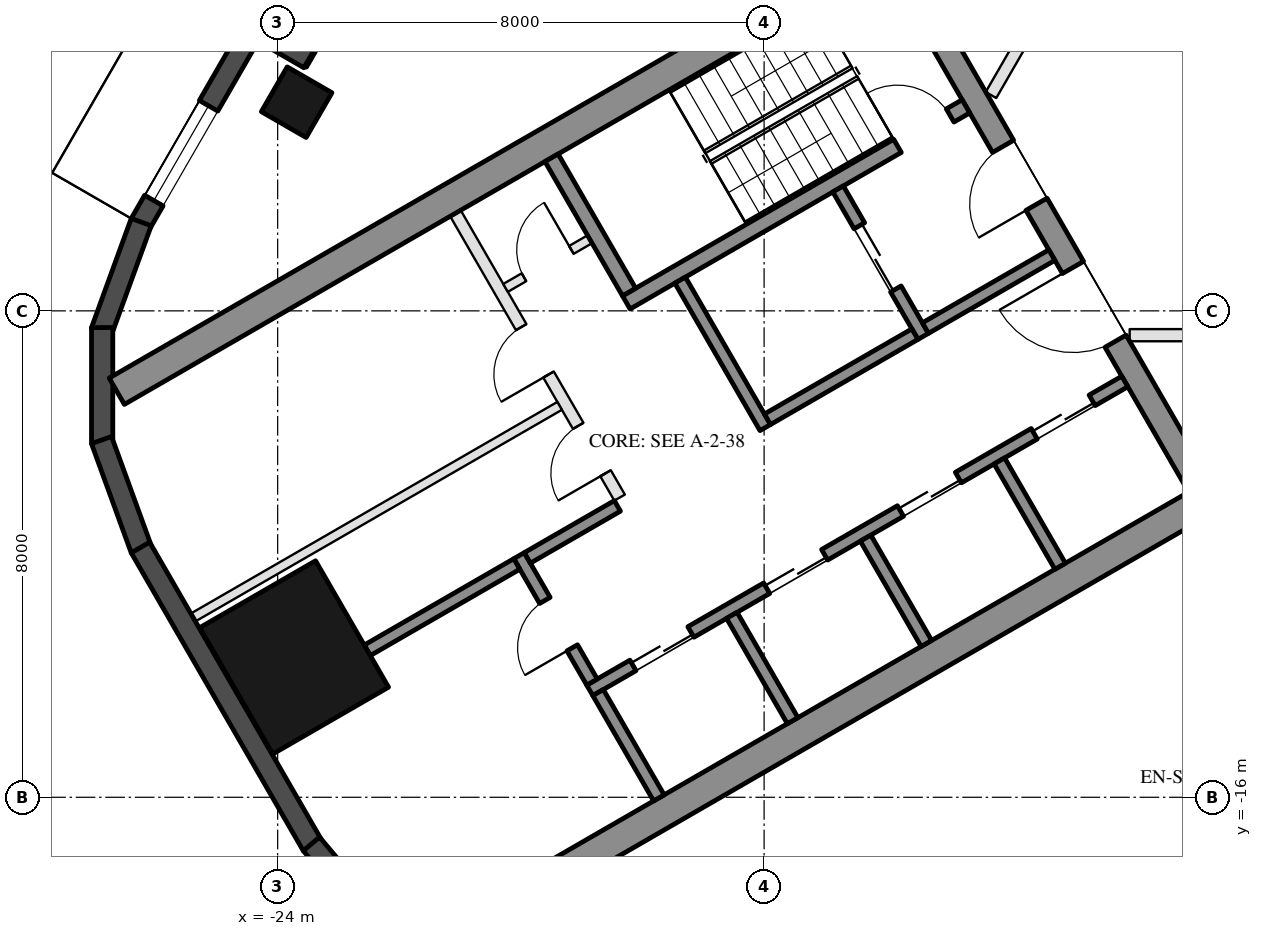
"""IFC4 building model, lengths in metres.
Left out: names, types, materials, properties, quantities, classifications, styles, units other than length and angle.
Written with IfcOpenShell. Run it as: python <this file> out.ifc"""

import sys

from ifc_helpers import new_model, si_unit, direction, frame, frame_2d, origin, origin_2d, place, context, subcontext, project, spatial, rectangle, hollow_rectangle, extrude, element, fill, save


model = new_model("IFC4")
c1 = context("Model", 3, precision=1e-05, world=origin(), true_north=direction((0.0, 1.0)))
c2 = subcontext(c1, "Body", "Model", "MODEL_VIEW")
j1 = project(units=[si_unit("LENGTHUNIT", "METRE"), si_unit("PLANEANGLEUNIT", "RADIAN")], contexts=[c1])
p1 = place(None, origin())
s1 = spatial("IfcSite", under=j1, at=p1, CompositionType="ELEMENT")
p2 = place(p1, origin())
s2 = spatial("IfcBuilding", under=s1, at=p2, CompositionType="ELEMENT")
p3 = place(p2, frame((0.0, 0.0, 165.1)))
s3 = spatial("IfcBuildingStorey", under=s2, at=p3, CompositionType="ELEMENT", Elevation=165.1)
p4 = place(p3, frame((-23.688, -4.568, 0.0), z_axis=(0.0, 0.0, 1.0), x_axis=(0.5, 0.866025403784, 0.0)))
e1 = element("IfcColumn", 1, at=p4, inside=s3, PredefinedType="COLUMN", context=c2, shape_type="SweptSolid", body=[
    extrude(hollow_rectangle(XDim=0.85, YDim=0.85, WallThickness=0.04, at=origin_2d()), origin(), (0.0, 0.0, 1.0), 3.7),
])
p5 = place(p3, frame((-23.729, -13.7, 0.0), z_axis=(0.0, 0.0, 1.0), x_axis=(-0.5, 0.866025403784, 0.0)))
e2 = element("IfcColumn", 2, at=p5, inside=s3, PredefinedType="COLUMN", context=c2, shape_type="SweptSolid", body=[
    extrude(hollow_rectangle(XDim=2.4, YDim=2.2, WallThickness=0.06, at=origin_2d()), origin(), (0.0, 0.0, 1.0), 3.7),
])
p6 = place(p3, frame((-20.309, 1.934, 0.0), z_axis=(0.0, 0.0, 1.0), x_axis=(-0.499992114976, -0.866029956157, 0.0)))
e3 = element("IfcWall", 3, at=p6, inside=s3, PredefinedType="SOLIDWALL", context=c2, shape_type="SweptSolid", body=[
    extrude(rectangle(XDim=6.74, YDim=0.35, at=frame_2d((3.37, 0.0))), origin(), (0.0, 0.0, 1.0), 3.55),
])
p7 = place(p6, frame((4.02, 0.0, 0.0)))
e4 = element("IfcOpeningElement", 4, at=p7, cuts=e3, PredefinedType="OPENING", context=c2, shape_type="SweptSolid", body=[
    extrude(rectangle(XDim=2.4, YDim=2.4, at=frame_2d((1.2, 1.2))), frame((0.0, 0.185, 0.0), z_axis=(0.0, -1.0, 0.0), x_axis=(1.0, 0.0, 0.0)), (0.0, 0.0, 1.0), 0.37),
])
p8 = place(p6, frame((0.77, 0.0, 0.3)))
e5 = element("IfcOpeningElement", 5, at=p8, cuts=e3, PredefinedType="OPENING", context=c2, shape_type="SweptSolid", body=[
    extrude(rectangle(XDim=2.9, YDim=2.65, at=frame_2d((1.45, 1.325))), frame((0.0, 0.185, 0.0), z_axis=(0.0, -1.0, 0.0), x_axis=(1.0, 0.0, 0.0)), (0.0, 0.0, 1.0), 0.37),
])
p9 = place(p3, frame((-23.481, -3.85, 0.0), z_axis=(0.0, 0.0, 1.0), x_axis=(-0.866092288191, 0.499884134912, 0.0)))
e6 = element("IfcWall", 6, at=p9, inside=s3, PredefinedType="SOLIDWALL", context=c2, shape_type="SweptSolid", body=[
    extrude(rectangle(XDim=1.22, YDim=0.35, at=frame_2d((0.61, 0.0))), origin(), (0.0, 0.0, 1.0), 3.55),
])
p10 = place(p3, frame((-24.299, -3.176, 0.0), z_axis=(0.0, 0.0, 1.0), x_axis=(-0.500028278809, -0.866009076391, 0.0)))
e7 = element("IfcWall", 7, at=p10, inside=s3, PredefinedType="SOLIDWALL", context=c2, shape_type="SweptSolid", body=[
    extrude(rectangle(XDim=3.916, YDim=0.35, at=frame_2d((1.958, 0.0))), origin(), (0.0, 0.0, 1.0), 3.55),
])
p11 = place(p10, frame((1.675, 0.0, 0.3)))
e8 = element("IfcOpeningElement", 8, at=p11, cuts=e7, PredefinedType="OPENING", context=c2, shape_type="SweptSolid", body=[
    extrude(rectangle(XDim=1.8, YDim=2.65, at=frame_2d((0.9, 1.325))), frame((0.0, 0.185, 0.0), z_axis=(0.0, -1.0, 0.0), x_axis=(1.0, 0.0, 0.0)), (0.0, 0.0, 1.0), 0.37),
])
for number, where, z_axis, x_axis in (
    (9, (-26.244, -6.54, 0.0), (0.0, 0.0, 1.0), (-0.342, -0.94, 0.0)),
    (10, (-26.886, -8.275, 0.0), (0.0, 0.0, 1.0), (0.0, -1.0, 0.0)),
    (11, (-26.897, -10.125, 0.0), (0.0, 0.0, 1.0), (0.342, -0.94, 0.0)),
):
    element("IfcWall", number, at=place(p3, frame(where, z_axis=z_axis, x_axis=x_axis)), inside=s3, PredefinedType="SOLIDWALL", context=c2, shape_type="SweptSolid", body=[
        extrude(rectangle(XDim=1.91, YDim=0.35, at=frame_2d((0.955, 0.0))), origin(), (0.0, 0.0, 1.0), 3.55),
    ])
p12 = place(p3, frame((-26.257, -11.893, 0.0), z_axis=(0.0, 0.0, 1.0), x_axis=(0.500018773155, -0.866014564827, 0.0)))
e12 = element("IfcWall", 12, at=p12, inside=s3, PredefinedType="SOLIDWALL", context=c2, shape_type="SweptSolid", body=[
    extrude(rectangle(XDim=5.658, YDim=0.35, at=frame_2d((2.829, 0.0))), origin(), (0.0, 0.0, 1.0), 3.55),
])
p13 = place(p3, frame((-23.445, -16.768, 0.0), z_axis=(0.0, 0.0, 1.0), x_axis=(0.642733291068, -0.76609001857, 0.0)))
e13 = element("IfcWall", 13, at=p13, inside=s3, PredefinedType="SOLIDWALL", context=c2, shape_type="SweptSolid", body=[
    extrude(rectangle(XDim=1.91, YDim=0.35, at=frame_2d((0.955, 0.0))), origin(), (0.0, 0.0, 1.0), 3.55),
])
for number, where, z_axis, x_axis in (
    (14, (-13.797, -1.903, 0.0), (0.0, 0.0, 1.0), (-0.866, -0.5, 0.0)),
    (15, (-8.547, -10.997, 0.0), (0.0, 0.0, 1.0), (-0.866, -0.5, 0.0)),
):
    element("IfcWall", number, at=place(p3, frame(where, z_axis=z_axis, x_axis=x_axis)), inside=s3, PredefinedType="SHEAR", context=c2, shape_type="SweptSolid", body=[
        extrude(rectangle(XDim=14.837, YDim=0.5, at=frame_2d((7.418, 0.0))), origin(), (0.0, 0.0, 1.0), 3.5),
    ])
p14 = place(p3, frame((-13.845, -2.22, 0.0), z_axis=(0.0, 0.0, 1.0), x_axis=(0.500004234368, -0.866022959057, 0.0)))
e16 = element("IfcWall", 16, at=p14, inside=s3, PredefinedType="SHEAR", context=c2, shape_type="SweptSolid", body=[
    extrude(rectangle(XDim=10.0, YDim=0.4, at=frame_2d((5.0, 0.0))), origin(), (0.0, 0.0, 1.0), 3.5),
])
p15 = place(p14, frame((3.55, 0.0, 0.0)))
e17 = element("IfcOpeningElement", 17, at=p15, cuts=e16, PredefinedType="OPENING", context=c2, shape_type="SweptSolid", body=[
    extrude(rectangle(XDim=1.1, YDim=2.1, at=frame_2d((0.55, 1.05))), frame((0.0, 0.21, 0.0), z_axis=(0.0, -1.0, 0.0), x_axis=(1.0, 0.0, 0.0)), (0.0, 0.0, 1.0), 0.42),
])
p16 = place(p14, frame((5.85, 0.0, 0.0)))
e18 = element("IfcOpeningElement", 18, at=p16, cuts=e16, PredefinedType="OPENING", context=c2, shape_type="SweptSolid", body=[
    extrude(rectangle(XDim=1.4, YDim=2.1, at=frame_2d((0.7, 1.05))), frame((0.0, 0.21, 0.0), z_axis=(0.0, -1.0, 0.0), x_axis=(1.0, 0.0, 0.0)), (0.0, 0.0, 1.0), 0.42),
])
p17 = place(p3, frame((-12.681, -4.636, 0.0), z_axis=(0.0, 0.0, 1.0), x_axis=(-0.866021702275, -0.500006411147, 0.0)))
e19 = element("IfcWall", 19, at=p17, inside=s3, PredefinedType="SHEAR", context=c2, shape_type="SweptSolid", body=[
    extrude(rectangle(XDim=6.45, YDim=0.25, at=frame_2d((3.225, 0.0))), origin(), (0.0, 0.0, 1.0), 3.5),
])
p18 = place(p17, frame((0.3, 0.0, 0.0)))
e20 = element("IfcOpeningElement", 20, at=p18, cuts=e19, PredefinedType="OPENING", context=c2, shape_type="SweptSolid", body=[
    extrude(rectangle(XDim=1.0, YDim=2.1, at=frame_2d((0.5, 1.05))), frame((0.0, 0.135, 0.0), z_axis=(0.0, -1.0, 0.0), x_axis=(1.0, 0.0, 0.0)), (0.0, 0.0, 1.0), 0.27),
])
p19 = place(p3, frame((-19.496, -5.482, 0.0), z_axis=(0.0, 0.0, 1.0), x_axis=(0.499990435942, -0.866030925526, 0.0)))
e21 = element("IfcWall", 21, at=p19, inside=s3, PredefinedType="SHEAR", context=c2, shape_type="SweptSolid", body=[
    extrude(rectangle(XDim=2.55, YDim=0.25, at=frame_2d((1.275, 0.0))), origin(), (0.0, 0.0, 1.0), 3.5),
])
p20 = place(p3, frame((-17.381, -7.495, 0.0), z_axis=(0.0, 0.0, 1.0), x_axis=(0.500011755427, -0.866018616679, 0.0)))
e22 = element("IfcWall", 22, at=p20, inside=s3, PredefinedType="SHEAR", context=c2, shape_type="SweptSolid", body=[
    extrude(rectangle(XDim=2.8, YDim=0.2, at=frame_2d((1.4, 0.0))), origin(), (0.0, 0.0, 1.0), 3.5),
])
p21 = place(p3, frame((-14.783, -5.995, 0.0), z_axis=(0.0, 0.0, 1.0), x_axis=(0.49994636267, -0.866056369097, 0.0)))
e23 = element("IfcWall", 23, at=p21, inside=s3, PredefinedType="SHEAR", context=c2, shape_type="SweptSolid", body=[
    extrude(rectangle(XDim=2.8, YDim=0.2, at=frame_2d((1.4, 0.0))), origin(), (0.0, 0.0, 1.0), 3.5),
])
p22 = place(p21, frame((0.7, 0.0, 0.0)))
e24 = element("IfcOpeningElement", 24, at=p22, cuts=e23, PredefinedType="OPENING", context=c2, shape_type="SweptSolid", body=[
    extrude(rectangle(XDim=1.2, YDim=2.1, at=frame_2d((0.6, 1.05))), frame((0.0, 0.11, 0.0), z_axis=(0.0, -1.0, 0.0), x_axis=(1.0, 0.0, 0.0)), (0.0, 0.0, 1.0), 0.22),
])
p23 = place(p3, frame((-13.52, -8.383, 0.0), z_axis=(0.0, 0.0, 1.0), x_axis=(-0.866034573852, -0.49998411664, 0.0)))
e25 = element("IfcWall", 25, at=p23, inside=s3, PredefinedType="SHEAR", context=c2, shape_type="SweptSolid", body=[
    extrude(rectangle(XDim=2.8, YDim=0.2, at=frame_2d((1.4, 0.0))), origin(), (0.0, 0.0, 1.0), 3.5),
])
p24 = place(p3, frame((-11.268, -7.083, 0.0), z_axis=(0.0, 0.0, 1.0), x_axis=(-0.866050077142, -0.499957262057, 0.0)))
e26 = element("IfcWall", 26, at=p24, inside=s3, PredefinedType="SHEAR", context=c2, shape_type="SweptSolid", body=[
    extrude(rectangle(XDim=2.4, YDim=0.2, at=frame_2d((1.2, 0.0))), origin(), (0.0, 0.0, 1.0), 3.5),
])
p25 = place(p3, frame((-10.068, -9.162, 0.0), z_axis=(0.0, 0.0, 1.0), x_axis=(-0.866032725843, -0.499987317609, 0.0)))
e27 = element("IfcWall", 27, at=p25, inside=s3, PredefinedType="SHEAR", context=c2, shape_type="SweptSolid", body=[
    extrude(rectangle(XDim=10.16, YDim=0.2, at=frame_2d((5.08, 0.0))), origin(), (0.0, 0.0, 1.0), 3.5),
])
p26 = place(p25, frame((0.62, 0.0, 0.0)))
e28 = element("IfcOpeningElement", 28, at=p26, cuts=e27, PredefinedType="OPENING", context=c2, shape_type="SweptSolid", body=[
    extrude(rectangle(XDim=1.1, YDim=2.1, at=frame_2d((0.55, 1.05))), frame((0.0, 0.11, 0.0), z_axis=(0.0, -1.0, 0.0), x_axis=(1.0, 0.0, 0.0)), (0.0, 0.0, 1.0), 0.22),
])
p27 = place(p25, frame((3.16, 0.0, 0.0)))
e29 = element("IfcOpeningElement", 29, at=p27, cuts=e27, PredefinedType="OPENING", context=c2, shape_type="SweptSolid", body=[
    extrude(rectangle(XDim=1.1, YDim=2.1, at=frame_2d((0.55, 1.05))), frame((0.0, 0.11, 0.0), z_axis=(0.0, -1.0, 0.0), x_axis=(1.0, 0.0, 0.0)), (0.0, 0.0, 1.0), 0.22),
])
p28 = place(p25, frame((5.7, 0.0, 0.0)))
e30 = element("IfcOpeningElement", 30, at=p28, cuts=e27, PredefinedType="OPENING", context=c2, shape_type="SweptSolid", body=[
    extrude(rectangle(XDim=1.1, YDim=2.1, at=frame_2d((0.55, 1.05))), frame((0.0, 0.11, 0.0), z_axis=(0.0, -1.0, 0.0), x_axis=(1.0, 0.0, 0.0)), (0.0, 0.0, 1.0), 0.22),
])
p29 = place(p25, frame((8.24, 0.0, 0.0)))
e31 = element("IfcOpeningElement", 31, at=p29, cuts=e27, PredefinedType="OPENING", context=c2, shape_type="SweptSolid", body=[
    extrude(rectangle(XDim=1.1, YDim=2.1, at=frame_2d((0.55, 1.05))), frame((0.0, 0.11, 0.0), z_axis=(0.0, -1.0, 0.0), x_axis=(1.0, 0.0, 0.0)), (0.0, 0.0, 1.0), 0.22),
])
p30 = place(p3, frame((-20.031, -12.026, 0.0), z_axis=(0.0, 0.0, 1.0), x_axis=(0.500033551112, -0.866006032174, 0.0)))
e32 = element("IfcWall", 32, at=p30, inside=s3, PredefinedType="SHEAR", context=c2, shape_type="SweptSolid", body=[
    extrude(rectangle(XDim=2.4, YDim=0.2, at=frame_2d((1.2, 0.0))), origin(), (0.0, 0.0, 1.0), 3.5),
])
p31 = place(p30, frame((0.85, 0.0, 0.0)))
e33 = element("IfcOpeningElement", 33, at=p31, cuts=e32, PredefinedType="OPENING", context=c2, shape_type="SweptSolid", body=[
    extrude(rectangle(XDim=0.9, YDim=2.1, at=frame_2d((0.45, 1.05))), frame((0.0, 0.11, 0.0), z_axis=(0.0, -1.0, 0.0), x_axis=(1.0, 0.0, 0.0)), (0.0, 0.0, 1.0), 0.22),
])
p32 = place(p3, frame((-18.413, -11.208, 0.0), z_axis=(0.0, 0.0, 1.0), x_axis=(-0.866038183914, -0.499977863513, 0.0)))
e34 = element("IfcWall", 34, at=p32, inside=s3, PredefinedType="SHEAR", context=c2, shape_type="SweptSolid", body=[
    extrude(rectangle(XDim=1.71, YDim=0.2, at=frame_2d((0.855, 0.0))), origin(), (0.0, 0.0, 1.0), 3.5),
])
for number, where, z_axis, x_axis in (
    (35, (-12.131, -10.468, 0.0), (0.0, 0.0, 1.0), (0.5, -0.866, 0.0)),
    (36, (-14.331, -11.738, 0.0), (0.0, 0.0, 1.0), (0.5, -0.866, 0.0)),
    (37, (-16.531, -13.008, 0.0), (0.0, 0.0, 1.0), (0.5, -0.866, 0.0)),
    (38, (-18.73, -14.278, 0.0), (0.0, 0.0, 1.0), (0.5, -0.866, 0.0)),
):
    element("IfcWall", number, at=place(p3, frame(where, z_axis=z_axis, x_axis=x_axis)), inside=s3, PredefinedType="SHEAR", context=c2, shape_type="SweptSolid", body=[
        extrude(rectangle(XDim=2.0, YDim=0.2, at=frame_2d((1.0, 0.0))), origin(), (0.0, 0.0, 1.0), 3.5),
    ])
p33 = place(p3, frame((-20.067, -12.163, 0.0), z_axis=(0.0, 0.0, 1.0), x_axis=(-0.866055327414, -0.49994816717, 0.0)))
e39 = element("IfcWall", 39, at=p33, inside=s3, PredefinedType="SHEAR", context=c2, shape_type="SweptSolid", body=[
    extrude(rectangle(XDim=2.84, YDim=0.2, at=frame_2d((1.42, 0.0))), origin(), (0.0, 0.0, 1.0), 3.5),
])
p34 = place(p3, frame((-21.076, -6.395, 0.0), z_axis=(0.0, 0.0, 1.0), x_axis=(0.50001468107, -0.866016927499, 0.0)))
e40 = element("IfcWall", 40, at=p34, inside=s3, PredefinedType="PARTITIONING", context=c2, shape_type="SweptSolid", body=[
    extrude(rectangle(XDim=5.4, YDim=0.2, at=frame_2d((2.7, 0.0))), origin(), (0.0, 0.0, 1.0), 3.5),
])
p35 = place(p34, frame((2.163, 0.0, 0.0)))
e41 = element("IfcOpeningElement", 41, at=p35, cuts=e40, PredefinedType="OPENING", context=c2, shape_type="SweptSolid", body=[
    extrude(rectangle(XDim=0.9, YDim=2.1, at=frame_2d((0.45, 1.05))), frame((0.0, 0.11, 0.0), z_axis=(0.0, -1.0, 0.0), x_axis=(1.0, 0.0, 0.0)), (0.0, 0.0, 1.0), 0.22),
])
p36 = place(p34, frame((4.038, 0.0, 0.0)))
e42 = element("IfcOpeningElement", 42, at=p36, cuts=e40, PredefinedType="OPENING", context=c2, shape_type="SweptSolid", body=[
    extrude(rectangle(XDim=0.9, YDim=2.1, at=frame_2d((0.45, 1.05))), frame((0.0, 0.11, 0.0), z_axis=(0.0, -1.0, 0.0), x_axis=(1.0, 0.0, 0.0)), (0.0, 0.0, 1.0), 0.22),
])
p37 = place(p3, frame((-18.866, -6.822, 0.0), z_axis=(0.0, 0.0, 1.0), x_axis=(-0.866028054938, -0.499995408039, 0.0)))
e43 = element("IfcWall", 43, at=p37, inside=s3, PredefinedType="PARTITIONING", context=c2, shape_type="SweptSolid", body=[
    extrude(rectangle(XDim=1.6, YDim=0.15, at=frame_2d((0.8, 0.0))), origin(), (0.0, 0.0, 1.0), 3.5),
])
p38 = place(p37, frame((0.35, 0.0, 0.0)))
e44 = element("IfcOpeningElement", 44, at=p38, cuts=e43, PredefinedType="OPENING", context=c2, shape_type="SweptSolid", body=[
    extrude(rectangle(XDim=0.9, YDim=2.1, at=frame_2d((0.45, 1.05))), frame((0.0, 0.085, 0.0), z_axis=(0.0, -1.0, 0.0), x_axis=(1.0, 0.0, 0.0)), (0.0, 0.0, 1.0), 0.17),
])
p39 = place(p3, frame((-19.363, -9.562, 0.0), z_axis=(0.0, 0.0, 1.0), x_axis=(-0.866016523273, -0.500015381182, 0.0)))
e45 = element("IfcWall", 45, at=p39, inside=s3, PredefinedType="PARTITIONING", context=c2, shape_type="SweptSolid", body=[
    extrude(rectangle(XDim=6.95, YDim=0.15, at=frame_2d((3.475, 0.0))), origin(), (0.0, 0.0, 1.0), 3.5),
])
p40 = place(p3, frame((-6.112, -8.4, 0.0), z_axis=(0.0, 0.0, 1.0), x_axis=(-1.0, 0.0, 0.0)))
e46 = element("IfcWall", 46, at=p40, inside=s3, PredefinedType="PARTITIONING", context=c2, shape_type="SweptSolid", body=[
    extrude(rectangle(XDim=3.876, YDim=0.2, at=frame_2d((1.938, 0.0))), origin(), (0.0, 0.0, 1.0), 2.95),
])
p41 = place(p40, frame((1.438, 0.0, 0.0)))
e47 = element("IfcOpeningElement", 47, at=p41, cuts=e46, PredefinedType="OPENING", context=c2, shape_type="SweptSolid", body=[
    extrude(rectangle(XDim=1.0, YDim=2.1, at=frame_2d((0.5, 1.05))), frame((0.0, 0.11, 0.0), z_axis=(0.0, -1.0, 0.0), x_axis=(1.0, 0.0, 0.0)), (0.0, 0.0, 1.0), 0.22),
])
p42 = place(p3, frame((-12.269, -4.45, 0.0), z_axis=(0.0, 0.0, 1.0), x_axis=(0.500008716408, 0.866020371305, 0.0)))
e48 = element("IfcWall", 48, at=p42, inside=s3, PredefinedType="PARTITIONING", context=c2, shape_type="SweptSolid", body=[
    extrude(rectangle(XDim=3.888, YDim=0.2, at=frame_2d((1.944, 0.0))), origin(), (0.0, 0.0, 1.0), 2.95),
])
p43 = place(p42, frame((1.444, 0.0, 0.0)))
e49 = element("IfcOpeningElement", 49, at=p43, cuts=e48, PredefinedType="OPENING", context=c2, shape_type="SweptSolid", body=[
    extrude(rectangle(XDim=1.0, YDim=2.1, at=frame_2d((0.5, 1.05))), frame((0.0, 0.11, 0.0), z_axis=(0.0, -1.0, 0.0), x_axis=(1.0, 0.0, 0.0)), (0.0, 0.0, 1.0), 0.22),
])
p44 = place(p11, origin())
e50 = element("IfcWindow", 50, at=p44, inside=s3, PartitioningType="SINGLE_PANEL", PredefinedType="WINDOW", context=c2, shape_type="SweptSolid", body=[
    extrude(rectangle(XDim=1.8, YDim=2.65, at=frame_2d((0.9, 1.325))), frame((0.0, 0.03, 0.0), z_axis=(0.0, -1.0, 0.0), x_axis=(1.0, 0.0, 0.0)), (0.0, 0.0, 1.0), 0.06),
])
fill(e8, e50)
p45 = place(p22, origin())
e51 = element("IfcDoor", 51, at=p45, inside=s3, OperationType="DOUBLE_DOOR_SLIDING", PredefinedType="DOOR", context=c2, shape_type="SweptSolid", body=[
    extrude(rectangle(XDim=1.2, YDim=2.1, at=frame_2d((0.6, 1.05))), frame((0.0, 0.025, 0.0), z_axis=(0.0, -1.0, 0.0), x_axis=(1.0, 0.0, 0.0)), (0.0, 0.0, 1.0), 0.05),
])
fill(e24, e51)
p46 = place(p38, frame((0.9, 0.0, 0.0), z_axis=(0.0, 0.0, 1.0), x_axis=(-1.0, 0.0, 0.0)))
e52 = element("IfcDoor", 52, at=p46, inside=s3, OperationType="SINGLE_SWING_RIGHT", PredefinedType="DOOR", context=c2, shape_type="SweptSolid", body=[
    extrude(rectangle(XDim=0.9, YDim=2.1, at=frame_2d((0.45, 1.05))), frame((0.0, 0.025, 0.0), z_axis=(0.0, -1.0, 0.0), x_axis=(1.0, 0.0, 0.0)), (0.0, 0.0, 1.0), 0.05),
])
fill(e44, e52)
p47 = place(p26, origin())
e53 = element("IfcDoor", 53, at=p47, inside=s3, OperationType="DOUBLE_DOOR_SLIDING", PredefinedType="DOOR", context=c2, shape_type="SweptSolid", body=[
    extrude(rectangle(XDim=1.1, YDim=2.1, at=frame_2d((0.55, 1.05))), frame((0.0, 0.025, 0.0), z_axis=(0.0, -1.0, 0.0), x_axis=(1.0, 0.0, 0.0)), (0.0, 0.0, 1.0), 0.05),
])
fill(e28, e53)
p48 = place(p27, origin())
e54 = element("IfcDoor", 54, at=p48, inside=s3, OperationType="DOUBLE_DOOR_SLIDING", PredefinedType="DOOR", context=c2, shape_type="SweptSolid", body=[
    extrude(rectangle(XDim=1.1, YDim=2.1, at=frame_2d((0.55, 1.05))), frame((0.0, 0.025, 0.0), z_axis=(0.0, -1.0, 0.0), x_axis=(1.0, 0.0, 0.0)), (0.0, 0.0, 1.0), 0.05),
])
fill(e29, e54)
p49 = place(p28, origin())
e55 = element("IfcDoor", 55, at=p49, inside=s3, OperationType="DOUBLE_DOOR_SLIDING", PredefinedType="DOOR", context=c2, shape_type="SweptSolid", body=[
    extrude(rectangle(XDim=1.1, YDim=2.1, at=frame_2d((0.55, 1.05))), frame((0.0, 0.025, 0.0), z_axis=(0.0, -1.0, 0.0), x_axis=(1.0, 0.0, 0.0)), (0.0, 0.0, 1.0), 0.05),
])
fill(e30, e55)
p50 = place(p29, origin())
e56 = element("IfcDoor", 56, at=p50, inside=s3, OperationType="DOUBLE_DOOR_SLIDING", PredefinedType="DOOR", context=c2, shape_type="SweptSolid", body=[
    extrude(rectangle(XDim=1.1, YDim=2.1, at=frame_2d((0.55, 1.05))), frame((0.0, 0.025, 0.0), z_axis=(0.0, -1.0, 0.0), x_axis=(1.0, 0.0, 0.0)), (0.0, 0.0, 1.0), 0.05),
])
fill(e31, e56)
p51 = place(p31, frame((0.9, 0.0, 0.0), z_axis=(0.0, 0.0, 1.0), x_axis=(-1.0, 0.0, 0.0)))
e57 = element("IfcDoor", 57, at=p51, inside=s3, OperationType="SINGLE_SWING_LEFT", PredefinedType="DOOR", context=c2, shape_type="SweptSolid", body=[
    extrude(rectangle(XDim=0.9, YDim=2.1, at=frame_2d((0.45, 1.05))), frame((0.0, 0.025, 0.0), z_axis=(0.0, -1.0, 0.0), x_axis=(1.0, 0.0, 0.0)), (0.0, 0.0, 1.0), 0.05),
])
fill(e33, e57)
p52 = place(p35, frame((0.9, 0.0, 0.0), z_axis=(0.0, 0.0, 1.0), x_axis=(-1.0, 0.0, 0.0)))
e58 = element("IfcDoor", 58, at=p52, inside=s3, OperationType="SINGLE_SWING_LEFT", PredefinedType="DOOR", context=c2, shape_type="SweptSolid", body=[
    extrude(rectangle(XDim=0.9, YDim=2.1, at=frame_2d((0.45, 1.05))), frame((0.0, 0.025, 0.0), z_axis=(0.0, -1.0, 0.0), x_axis=(1.0, 0.0, 0.0)), (0.0, 0.0, 1.0), 0.05),
])
fill(e41, e58)
p53 = place(p36, frame((0.9, 0.0, 0.0), z_axis=(0.0, 0.0, 1.0), x_axis=(-1.0, 0.0, 0.0)))
e59 = element("IfcDoor", 59, at=p53, inside=s3, OperationType="SINGLE_SWING_LEFT", PredefinedType="DOOR", context=c2, shape_type="SweptSolid", body=[
    extrude(rectangle(XDim=0.9, YDim=2.1, at=frame_2d((0.45, 1.05))), frame((0.0, 0.025, 0.0), z_axis=(0.0, -1.0, 0.0), x_axis=(1.0, 0.0, 0.0)), (0.0, 0.0, 1.0), 0.05),
])
fill(e42, e59)
p54 = place(p15, frame((1.1, 0.0, 0.0), z_axis=(0.0, 0.0, 1.0), x_axis=(-1.0, 0.0, 0.0)))
e60 = element("IfcDoor", 60, at=p54, inside=s3, OperationType="SINGLE_SWING_LEFT", PredefinedType="DOOR", context=c2, shape_type="SweptSolid", body=[
    extrude(rectangle(XDim=1.1, YDim=2.1, at=frame_2d((0.55, 1.05))), frame((0.0, 0.025, 0.0), z_axis=(0.0, -1.0, 0.0), x_axis=(1.0, 0.0, 0.0)), (0.0, 0.0, 1.0), 0.05),
])
fill(e17, e60)
p55 = place(p16, frame((1.4, 0.0, 0.0), z_axis=(0.0, 0.0, 1.0), x_axis=(-1.0, 0.0, 0.0)))
e61 = element("IfcDoor", 61, at=p55, inside=s3, OperationType="DOUBLE_DOOR_SINGLE_SWING", PredefinedType="DOOR", context=c2, shape_type="SweptSolid", body=[
    extrude(rectangle(XDim=1.4, YDim=2.1, at=frame_2d((0.7, 1.05))), frame((0.0, 0.025, 0.0), z_axis=(0.0, -1.0, 0.0), x_axis=(1.0, 0.0, 0.0)), (0.0, 0.0, 1.0), 0.05),
])
fill(e18, e61)
p56 = place(p18, frame((1.0, 0.0, 0.0), z_axis=(0.0, 0.0, 1.0), x_axis=(-1.0, 0.0, 0.0)))
e62 = element("IfcDoor", 62, at=p56, inside=s3, OperationType="SINGLE_SWING_LEFT", PredefinedType="DOOR", context=c2, shape_type="SweptSolid", body=[
    extrude(rectangle(XDim=1.0, YDim=2.1, at=frame_2d((0.5, 1.05))), frame((0.0, 0.025, 0.0), z_axis=(0.0, -1.0, 0.0), x_axis=(1.0, 0.0, 0.0)), (0.0, 0.0, 1.0), 0.05),
])
fill(e20, e62)
save(model, sys.argv[1])
